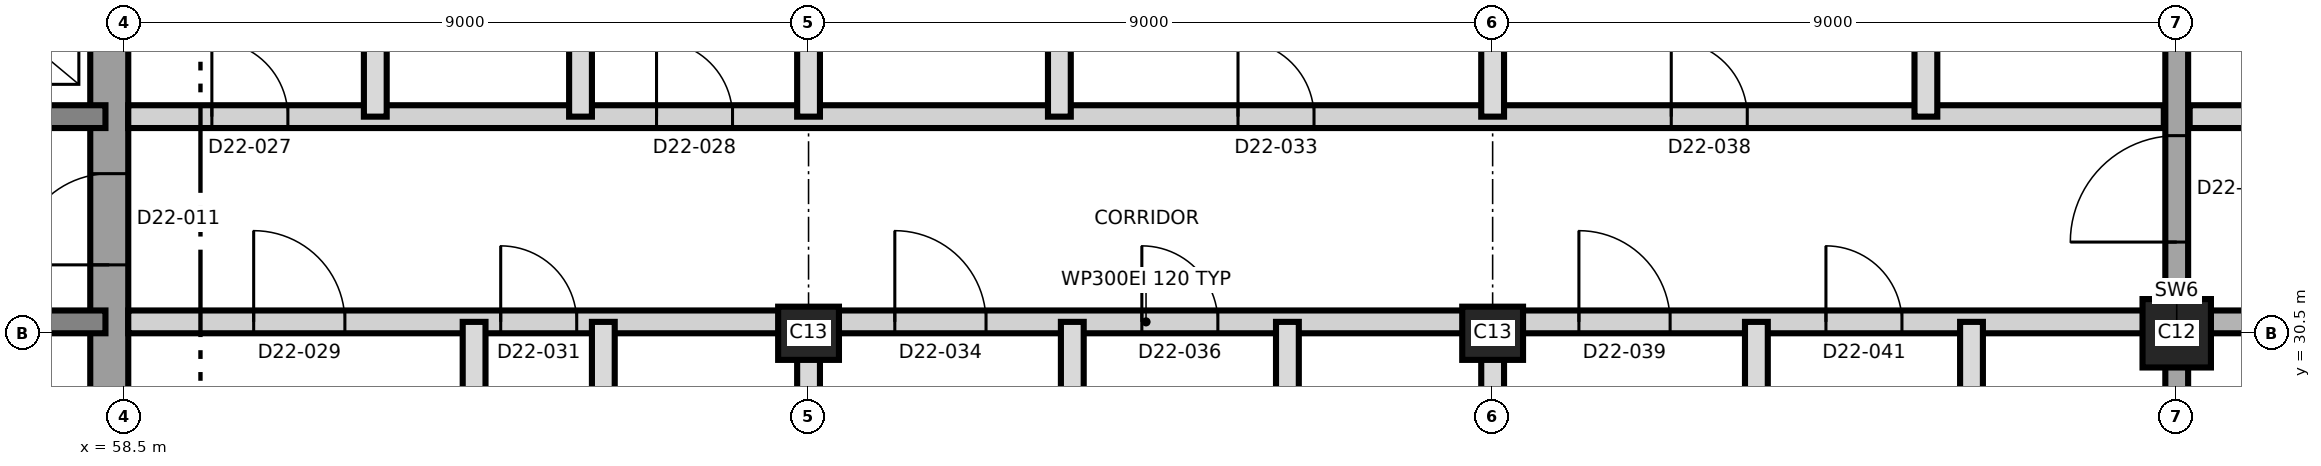
"""IFC4 building model, lengths in metres.
Left out: names, types, materials, properties, quantities, classifications, styles, units other than length and angle.
Written with IfcOpenShell. Run it as: python <this file> out.ifc"""

import sys

from ifc_helpers import new_model, si_unit, direction, frame, frame_2d, origin, origin_2d, place, context, subcontext, project, spatial, rectangle, extrude, element, fill, save


model = new_model("IFC4")
c1 = context("Model", 3, precision=1e-05, world=origin(), true_north=direction((0.0, 1.0)))
c2 = subcontext(c1, "Body", "Model", "MODEL_VIEW")
j1 = project(units=[si_unit("LENGTHUNIT", "METRE"), si_unit("PLANEANGLEUNIT", "RADIAN")], contexts=[c1])
p1 = place(None, origin())
s1 = spatial("IfcSite", under=j1, at=p1, CompositionType="ELEMENT")
p2 = place(p1, origin())
s2 = spatial("IfcBuilding", under=s1, at=p2, CompositionType="ELEMENT")
p3 = place(p2, frame((0.0, 0.0, 199.5)))
s3 = spatial("IfcBuildingStorey", under=s2, at=p3, CompositionType="ELEMENT", Elevation=199.5)
p4 = place(p3, frame((58.3, 21.25, 0.0), z_axis=(0.0, 0.0, 1.0), x_axis=(0.0, 1.0, 0.0)))
e1 = element("IfcWall", 1, at=p4, inside=s3, PredefinedType="SHEAR", context=c2, shape_type="SweptSolid", body=[
    extrude(rectangle(XDim=18.5, YDim=0.5, at=frame_2d((9.25, 0.0))), origin(), (0.0, 0.0, 1.0), 3.7),
])
p5 = place(p4, frame((10.15, 0.0, 0.0)))
e2 = element("IfcOpeningElement", 2, at=p5, cuts=e1, PredefinedType="OPENING", context=c2, shape_type="SweptSolid", body=[
    extrude(rectangle(XDim=1.2, YDim=2.1, at=frame_2d((0.6, 1.05))), frame((0.0, 0.26, 0.0), z_axis=(0.0, -1.0, 0.0), x_axis=(1.0, 0.0, 0.0)), (0.0, 0.0, 1.0), 0.52),
])
p6 = place(p3, frame((31.75, 30.65, 0.0), z_axis=(0.0, 0.0, 1.0), x_axis=(1.0, 0.0, 0.0)))
e3 = element("IfcWall", 3, at=p6, inside=s3, PredefinedType="SHEAR", context=c2, shape_type="SweptSolid", body=[
    extrude(rectangle(XDim=26.5, YDim=0.3, at=frame_2d((13.25, 0.0))), origin(), (0.0, 0.0, 1.0), 3.7),
])
p7 = place(p6, frame((24.75, 0.0, 0.0)))
e4 = element("IfcOpeningElement", 4, at=p7, cuts=e3, PredefinedType="OPENING", context=c2, shape_type="SweptSolid", body=[
    extrude(rectangle(XDim=1.0, YDim=2.1, at=frame_2d((0.5, 1.05))), frame((0.0, 0.16, 0.0), z_axis=(0.0, -1.0, 0.0), x_axis=(1.0, 0.0, 0.0)), (0.0, 0.0, 1.0), 0.32),
])
p8 = place(p6, frame((4.05, 0.0, 0.0)))
e5 = element("IfcOpeningElement", 5, at=p8, cuts=e3, PredefinedType="OPENING", context=c2, shape_type="SweptSolid", body=[
    extrude(rectangle(XDim=1.0, YDim=2.1, at=frame_2d((0.5, 1.05))), frame((0.0, 0.16, 0.0), z_axis=(0.0, -1.0, 0.0), x_axis=(1.0, 0.0, 0.0)), (0.0, 0.0, 1.0), 0.32),
])
p9 = place(p3, frame((31.75, 33.35, 0.0), z_axis=(0.0, 0.0, 1.0), x_axis=(1.0, 0.0, 0.0)))
e6 = element("IfcWall", 6, at=p9, inside=s3, PredefinedType="SHEAR", context=c2, shape_type="SweptSolid", body=[
    extrude(rectangle(XDim=26.5, YDim=0.3, at=frame_2d((13.25, 0.0))), origin(), (0.0, 0.0, 1.0), 3.7),
])
p10 = place(p9, frame((13.9, 0.0, 0.0)))
e7 = element("IfcOpeningElement", 7, at=p10, cuts=e6, PredefinedType="OPENING", context=c2, shape_type="SweptSolid", body=[
    extrude(rectangle(XDim=1.4, YDim=2.1, at=frame_2d((0.7, 1.05))), frame((0.0, 0.16, 0.0), z_axis=(0.0, -1.0, 0.0), x_axis=(1.0, 0.0, 0.0)), (0.0, 0.0, 1.0), 0.32),
])
p11 = place(p9, frame((5.375, 0.0, 0.0)))
e8 = element("IfcOpeningElement", 8, at=p11, cuts=e6, PredefinedType="OPENING", context=c2, shape_type="SweptSolid", body=[
    extrude(rectangle(XDim=1.2, YDim=2.1, at=frame_2d((0.6, 1.05))), frame((0.0, 0.16, 0.0), z_axis=(0.0, -1.0, 0.0), x_axis=(1.0, 0.0, 0.0)), (0.0, 0.0, 1.0), 0.32),
])
p12 = place(p9, frame((19.925, 0.0, 0.0)))
e9 = element("IfcOpeningElement", 9, at=p12, cuts=e6, PredefinedType="OPENING", context=c2, shape_type="SweptSolid", body=[
    extrude(rectangle(XDim=1.2, YDim=2.1, at=frame_2d((0.6, 1.05))), frame((0.0, 0.16, 0.0), z_axis=(0.0, -1.0, 0.0), x_axis=(1.0, 0.0, 0.0)), (0.0, 0.0, 1.0), 0.32),
])
for number, where, z_axis, x_axis in (
    (10, (67.5, 30.5, 0.0), (0.0, 0.0, 1.0), (1.0, 0.0, 0.0)),
    (11, (76.5, 30.5, 0.0), (0.0, 0.0, 1.0), (1.0, 0.0, 0.0)),
):
    element("IfcColumn", number, at=place(p3, frame(where, z_axis=z_axis, x_axis=x_axis)), inside=s3, PredefinedType="COLUMN", context=c2, shape_type="SweptSolid", body=[
        extrude(rectangle(XDim=0.8, YDim=0.7, at=origin_2d()), origin(), (0.0, 0.0, 1.0), 3.7),
    ])
p13 = place(p3, frame((85.5, 30.5, 0.0), z_axis=(0.0, 0.0, 1.0), x_axis=(1.0, 0.0, 0.0)))
e12 = element("IfcColumn", 12, at=p13, inside=s3, PredefinedType="COLUMN", context=c2, shape_type="SweptSolid", body=[
    extrude(rectangle(XDim=0.9, YDim=0.9, at=origin_2d()), origin(), (0.0, 0.0, 1.0), 3.7),
])
p14 = place(p3, frame((85.5, 20.135, 0.0), z_axis=(0.0, 0.0, 1.0), x_axis=(0.0, 1.0, 0.0)))
e13 = element("IfcWall", 13, at=p14, inside=s3, PredefinedType="SHEAR", context=c2, shape_type="SweptSolid", body=[
    extrude(rectangle(XDim=20.73, YDim=0.3, at=frame_2d((10.365, 0.0))), origin(), (0.0, 0.0, 1.0), 3.7),
])
p15 = place(p14, frame((11.565, 0.0, 0.0)))
e14 = element("IfcOpeningElement", 14, at=p15, cuts=e13, PredefinedType="OPENING", context=c2, shape_type="SweptSolid", body=[
    extrude(rectangle(XDim=1.4, YDim=2.1, at=frame_2d((0.7, 1.05))), frame((0.0, 0.16, 0.0), z_axis=(0.0, -1.0, 0.0), x_axis=(1.0, 0.0, 0.0)), (0.0, 0.0, 1.0), 0.32),
])
p16 = place(p3, frame((58.55, 30.65, 0.0), z_axis=(0.0, 0.0, 1.0), x_axis=(1.0, 0.0, 0.0)))
e15 = element("IfcWall", 15, at=p16, inside=s3, PredefinedType="PARTITIONING", context=c2, shape_type="SweptSolid", body=[
    extrude(rectangle(XDim=26.78, YDim=0.3, at=frame_2d((13.39, 0.0))), origin(), (0.0, 0.0, 1.0), 3.4),
])
p17 = place(p16, frame((1.65, 0.0, 0.0)))
e16 = element("IfcOpeningElement", 16, at=p17, cuts=e15, PredefinedType="OPENING", context=c2, shape_type="SweptSolid", body=[
    extrude(rectangle(XDim=1.2, YDim=2.1, at=frame_2d((0.6, 1.05))), frame((0.0, 0.16, 0.0), z_axis=(0.0, -1.0, 0.0), x_axis=(1.0, 0.0, 0.0)), (0.0, 0.0, 1.0), 0.32),
])
p18 = place(p16, frame((4.9, 0.0, 0.0)))
e17 = element("IfcOpeningElement", 17, at=p18, cuts=e15, PredefinedType="OPENING", context=c2, shape_type="SweptSolid", body=[
    extrude(rectangle(XDim=1.0, YDim=2.1, at=frame_2d((0.5, 1.05))), frame((0.0, 0.16, 0.0), z_axis=(0.0, -1.0, 0.0), x_axis=(1.0, 0.0, 0.0)), (0.0, 0.0, 1.0), 0.32),
])
p19 = place(p16, frame((10.085, 0.0, 0.0)))
e18 = element("IfcOpeningElement", 18, at=p19, cuts=e15, PredefinedType="OPENING", context=c2, shape_type="SweptSolid", body=[
    extrude(rectangle(XDim=1.2, YDim=2.1, at=frame_2d((0.6, 1.05))), frame((0.0, 0.16, 0.0), z_axis=(0.0, -1.0, 0.0), x_axis=(1.0, 0.0, 0.0)), (0.0, 0.0, 1.0), 0.32),
])
p20 = place(p16, frame((13.335, 0.0, 0.0)))
e19 = element("IfcOpeningElement", 19, at=p20, cuts=e15, PredefinedType="OPENING", context=c2, shape_type="SweptSolid", body=[
    extrude(rectangle(XDim=1.0, YDim=2.1, at=frame_2d((0.5, 1.05))), frame((0.0, 0.16, 0.0), z_axis=(0.0, -1.0, 0.0), x_axis=(1.0, 0.0, 0.0)), (0.0, 0.0, 1.0), 0.32),
])
p21 = place(p16, frame((19.085, 0.0, 0.0)))
e20 = element("IfcOpeningElement", 20, at=p21, cuts=e15, PredefinedType="OPENING", context=c2, shape_type="SweptSolid", body=[
    extrude(rectangle(XDim=1.2, YDim=2.1, at=frame_2d((0.6, 1.05))), frame((0.0, 0.16, 0.0), z_axis=(0.0, -1.0, 0.0), x_axis=(1.0, 0.0, 0.0)), (0.0, 0.0, 1.0), 0.32),
])
p22 = place(p16, frame((22.335, 0.0, 0.0)))
e21 = element("IfcOpeningElement", 21, at=p22, cuts=e15, PredefinedType="OPENING", context=c2, shape_type="SweptSolid", body=[
    extrude(rectangle(XDim=1.0, YDim=2.1, at=frame_2d((0.5, 1.05))), frame((0.0, 0.16, 0.0), z_axis=(0.0, -1.0, 0.0), x_axis=(1.0, 0.0, 0.0)), (0.0, 0.0, 1.0), 0.32),
])
p23 = place(p3, frame((85.67, 30.65, 0.0), z_axis=(0.0, 0.0, 1.0), x_axis=(1.0, 0.0, 0.0)))
e22 = element("IfcWall", 22, at=p23, inside=s3, PredefinedType="SHEAR", context=c2, shape_type="SweptSolid", body=[
    extrude(rectangle(XDim=9.58, YDim=0.3, at=frame_2d((4.79, 0.0))), origin(), (0.0, 0.0, 1.0), 3.4),
])
p24 = place(p23, frame((2.08, 0.0, 0.0)))
e23 = element("IfcOpeningElement", 23, at=p24, cuts=e22, PredefinedType="OPENING", context=c2, shape_type="SweptSolid", body=[
    extrude(rectangle(XDim=1.2, YDim=2.1, at=frame_2d((0.6, 1.05))), frame((0.0, 0.16, 0.0), z_axis=(0.0, -1.0, 0.0), x_axis=(1.0, 0.0, 0.0)), (0.0, 0.0, 1.0), 0.32),
])
p25 = place(p23, frame((5.63, 0.0, 0.0)))
e24 = element("IfcOpeningElement", 24, at=p25, cuts=e22, PredefinedType="OPENING", context=c2, shape_type="SweptSolid", body=[
    extrude(rectangle(XDim=1.0, YDim=2.1, at=frame_2d((0.5, 1.05))), frame((0.0, 0.16, 0.0), z_axis=(0.0, -1.0, 0.0), x_axis=(1.0, 0.0, 0.0)), (0.0, 0.0, 1.0), 0.32),
])
p26 = place(p3, frame((58.55, 33.35, 0.0), z_axis=(0.0, 0.0, 1.0), x_axis=(1.0, 0.0, 0.0)))
e25 = element("IfcWall", 25, at=p26, inside=s3, PredefinedType="PARTITIONING", context=c2, shape_type="SweptSolid", body=[
    extrude(rectangle(XDim=26.78, YDim=0.3, at=frame_2d((13.39, 0.0))), origin(), (0.0, 0.0, 1.0), 3.4),
])
p27 = place(p26, frame((1.1, 0.0, 0.0)))
e26 = element("IfcOpeningElement", 26, at=p27, cuts=e25, PredefinedType="OPENING", context=c2, shape_type="SweptSolid", body=[
    extrude(rectangle(XDim=1.0, YDim=2.1, at=frame_2d((0.5, 1.05))), frame((0.0, 0.16, 0.0), z_axis=(0.0, -1.0, 0.0), x_axis=(1.0, 0.0, 0.0)), (0.0, 0.0, 1.0), 0.32),
])
p28 = place(p26, frame((6.95, 0.0, 0.0)))
e27 = element("IfcOpeningElement", 27, at=p28, cuts=e25, PredefinedType="OPENING", context=c2, shape_type="SweptSolid", body=[
    extrude(rectangle(XDim=1.0, YDim=2.1, at=frame_2d((0.5, 1.05))), frame((0.0, 0.16, 0.0), z_axis=(0.0, -1.0, 0.0), x_axis=(1.0, 0.0, 0.0)), (0.0, 0.0, 1.0), 0.32),
])
p29 = place(p26, frame((14.6, 0.0, 0.0)))
e28 = element("IfcOpeningElement", 28, at=p29, cuts=e25, PredefinedType="OPENING", context=c2, shape_type="SweptSolid", body=[
    extrude(rectangle(XDim=1.0, YDim=2.4, at=frame_2d((0.5, 1.2))), frame((0.0, 0.16, 0.0), z_axis=(0.0, -1.0, 0.0), x_axis=(1.0, 0.0, 0.0)), (0.0, 0.0, 1.0), 0.32),
])
p30 = place(p26, frame((20.3, 0.0, 0.0)))
e29 = element("IfcOpeningElement", 29, at=p30, cuts=e25, PredefinedType="OPENING", context=c2, shape_type="SweptSolid", body=[
    extrude(rectangle(XDim=1.0, YDim=2.4, at=frame_2d((0.5, 1.2))), frame((0.0, 0.16, 0.0), z_axis=(0.0, -1.0, 0.0), x_axis=(1.0, 0.0, 0.0)), (0.0, 0.0, 1.0), 0.32),
])
p31 = place(p3, frame((85.67, 33.35, 0.0), z_axis=(0.0, 0.0, 1.0), x_axis=(1.0, 0.0, 0.0)))
e30 = element("IfcWall", 30, at=p31, inside=s3, PredefinedType="PARTITIONING", context=c2, shape_type="SweptSolid", body=[
    extrude(rectangle(XDim=9.58, YDim=0.3, at=frame_2d((4.79, 0.0))), origin(), (0.0, 0.0, 1.0), 3.4),
])
p32 = place(p31, frame((1.83, 0.0, 0.0)))
e31 = element("IfcOpeningElement", 31, at=p32, cuts=e30, PredefinedType="OPENING", context=c2, shape_type="SweptSolid", body=[
    extrude(rectangle(XDim=1.0, YDim=2.1, at=frame_2d((0.5, 1.05))), frame((0.0, 0.16, 0.0), z_axis=(0.0, -1.0, 0.0), x_axis=(1.0, 0.0, 0.0)), (0.0, 0.0, 1.0), 0.32),
])
p33 = place(p31, frame((5.63, 0.0, 0.0)))
e32 = element("IfcOpeningElement", 32, at=p33, cuts=e30, PredefinedType="OPENING", context=c2, shape_type="SweptSolid", body=[
    extrude(rectangle(XDim=1.0, YDim=2.1, at=frame_2d((0.5, 1.05))), frame((0.0, 0.16, 0.0), z_axis=(0.0, -1.0, 0.0), x_axis=(1.0, 0.0, 0.0)), (0.0, 0.0, 1.0), 0.32),
])
p34 = place(p3, frame((61.8, 33.35, 0.0), z_axis=(0.0, 0.0, 1.0), x_axis=(0.0, 1.0, 0.0)))
e33 = element("IfcWall", 33, at=p34, inside=s3, PredefinedType="PARTITIONING", context=c2, shape_type="SweptSolid", body=[
    extrude(rectangle(XDim=3.2, YDim=0.3, at=frame_2d((1.6, 0.0))), origin(), (0.0, 0.0, 1.0), 3.4),
])
p35 = place(p3, frame((63.1, 20.135, 0.0), z_axis=(0.0, 0.0, 1.0), x_axis=(0.0, 1.0, 0.0)))
e34 = element("IfcWall", 34, at=p35, inside=s3, PredefinedType="PARTITIONING", context=c2, shape_type="SweptSolid", body=[
    extrude(rectangle(XDim=10.515, YDim=0.3, at=frame_2d((5.257, 0.0))), origin(), (0.0, 0.0, 1.0), 3.4),
])
p36 = place(p3, frame((64.5, 33.35, 0.0), z_axis=(0.0, 0.0, 1.0), x_axis=(0.0, 1.0, 0.0)))
e35 = element("IfcWall", 35, at=p36, inside=s3, PredefinedType="PARTITIONING", context=c2, shape_type="SweptSolid", body=[
    extrude(rectangle(XDim=7.695, YDim=0.3, at=frame_2d((3.847, 0.0))), origin(), (0.0, 0.0, 1.0), 3.4),
])
p37 = place(p3, frame((64.8, 27.45, 0.0), z_axis=(0.0, 0.0, 1.0), x_axis=(0.0, 1.0, 0.0)))
e36 = element("IfcWall", 36, at=p37, inside=s3, PredefinedType="PARTITIONING", context=c2, shape_type="SweptSolid", body=[
    extrude(rectangle(XDim=3.2, YDim=0.3, at=frame_2d((1.6, 0.0))), origin(), (0.0, 0.0, 1.0), 3.4),
])
p38 = place(p3, frame((67.5, 20.135, 0.0), z_axis=(0.0, 0.0, 1.0), x_axis=(0.0, 1.0, 0.0)))
e37 = element("IfcWall", 37, at=p38, inside=s3, PredefinedType="PARTITIONING", context=c2, shape_type="SweptSolid", body=[
    extrude(rectangle(XDim=10.515, YDim=0.3, at=frame_2d((5.257, 0.0))), origin(), (0.0, 0.0, 1.0), 3.4),
])
p39 = place(p3, frame((67.5, 33.35, 0.0), z_axis=(0.0, 0.0, 1.0), x_axis=(0.0, 1.0, 0.0)))
e38 = element("IfcWall", 38, at=p39, inside=s3, PredefinedType="PARTITIONING", context=c2, shape_type="SweptSolid", body=[
    extrude(rectangle(XDim=7.695, YDim=0.3, at=frame_2d((3.847, 0.0))), origin(), (0.0, 0.0, 1.0), 3.4),
])
p40 = place(p3, frame((70.8, 33.35, 0.0), z_axis=(0.0, 0.0, 1.0), x_axis=(0.0, 1.0, 0.0)))
e39 = element("IfcWall", 39, at=p40, inside=s3, PredefinedType="PARTITIONING", context=c2, shape_type="SweptSolid", body=[
    extrude(rectangle(XDim=3.5, YDim=0.3, at=frame_2d((1.75, 0.0))), origin(), (0.0, 0.0, 1.0), 3.4),
])
p41 = place(p3, frame((70.97, 20.135, 0.0), z_axis=(0.0, 0.0, 1.0), x_axis=(0.0, 1.0, 0.0)))
e40 = element("IfcWall", 40, at=p41, inside=s3, PredefinedType="PARTITIONING", context=c2, shape_type="SweptSolid", body=[
    extrude(rectangle(XDim=10.515, YDim=0.3, at=frame_2d((5.257, 0.0))), origin(), (0.0, 0.0, 1.0), 3.4),
])
p42 = place(p3, frame((73.8, 27.45, 0.0), z_axis=(0.0, 0.0, 1.0), x_axis=(0.0, 1.0, 0.0)))
e41 = element("IfcWall", 41, at=p42, inside=s3, PredefinedType="PARTITIONING", context=c2, shape_type="SweptSolid", body=[
    extrude(rectangle(XDim=3.2, YDim=0.3, at=frame_2d((1.6, 0.0))), origin(), (0.0, 0.0, 1.0), 3.4),
])
p43 = place(p3, frame((76.5, 20.135, 0.0), z_axis=(0.0, 0.0, 1.0), x_axis=(0.0, 1.0, 0.0)))
e42 = element("IfcWall", 42, at=p43, inside=s3, PredefinedType="PARTITIONING", context=c2, shape_type="SweptSolid", body=[
    extrude(rectangle(XDim=10.515, YDim=0.3, at=frame_2d((5.257, 0.0))), origin(), (0.0, 0.0, 1.0), 3.4),
])
p44 = place(p3, frame((76.5, 33.35, 0.0), z_axis=(0.0, 0.0, 1.0), x_axis=(0.0, 1.0, 0.0)))
e43 = element("IfcWall", 43, at=p44, inside=s3, PredefinedType="PARTITIONING", context=c2, shape_type="SweptSolid", body=[
    extrude(rectangle(XDim=7.695, YDim=0.3, at=frame_2d((3.847, 0.0))), origin(), (0.0, 0.0, 1.0), 3.4),
])
p45 = place(p3, frame((79.97, 20.135, 0.0), z_axis=(0.0, 0.0, 1.0), x_axis=(0.0, 1.0, 0.0)))
e44 = element("IfcWall", 44, at=p45, inside=s3, PredefinedType="PARTITIONING", context=c2, shape_type="SweptSolid", body=[
    extrude(rectangle(XDim=10.515, YDim=0.3, at=frame_2d((5.257, 0.0))), origin(), (0.0, 0.0, 1.0), 3.4),
])
p46 = place(p3, frame((82.2, 33.35, 0.0), z_axis=(0.0, 0.0, 1.0), x_axis=(0.0, 1.0, 0.0)))
e45 = element("IfcWall", 45, at=p46, inside=s3, PredefinedType="PARTITIONING", context=c2, shape_type="SweptSolid", body=[
    extrude(rectangle(XDim=3.5, YDim=0.3, at=frame_2d((1.75, 0.0))), origin(), (0.0, 0.0, 1.0), 3.4),
])
p47 = place(p3, frame((82.8, 27.45, 0.0), z_axis=(0.0, 0.0, 1.0), x_axis=(0.0, 1.0, 0.0)))
e46 = element("IfcWall", 46, at=p47, inside=s3, PredefinedType="PARTITIONING", context=c2, shape_type="SweptSolid", body=[
    extrude(rectangle(XDim=3.2, YDim=0.3, at=frame_2d((1.6, 0.0))), origin(), (0.0, 0.0, 1.0), 3.4),
])
p48 = place(p5, origin())
e47 = element("IfcDoor", 47, at=p48, inside=s3, OperationType="SINGLE_SWING_LEFT", PredefinedType="DOOR", context=c2, shape_type="SweptSolid", body=[
    extrude(rectangle(XDim=1.2, YDim=2.1, at=frame_2d((0.6, 1.05))), frame((0.0, 0.025, 0.0), z_axis=(0.0, -1.0, 0.0), x_axis=(1.0, 0.0, 0.0)), (0.0, 0.0, 1.0), 0.05),
])
fill(e2, e47)
p49 = place(p27, origin())
e48 = element("IfcDoor", 48, at=p49, inside=s3, OperationType="SINGLE_SWING_LEFT", PredefinedType="DOOR", context=c2, shape_type="SweptSolid", body=[
    extrude(rectangle(XDim=1.0, YDim=2.1, at=frame_2d((0.5, 1.05))), frame((0.0, 0.025, 0.0), z_axis=(0.0, -1.0, 0.0), x_axis=(1.0, 0.0, 0.0)), (0.0, 0.0, 1.0), 0.05),
])
fill(e26, e48)
p50 = place(p28, origin())
e49 = element("IfcDoor", 49, at=p50, inside=s3, OperationType="SINGLE_SWING_RIGHT", PredefinedType="DOOR", context=c2, shape_type="SweptSolid", body=[
    extrude(rectangle(XDim=1.0, YDim=2.1, at=frame_2d((0.5, 1.05))), frame((0.0, 0.025, 0.0), z_axis=(0.0, -1.0, 0.0), x_axis=(1.0, 0.0, 0.0)), (0.0, 0.0, 1.0), 0.05),
])
fill(e27, e49)
p51 = place(p17, origin())
e50 = element("IfcDoor", 50, at=p51, inside=s3, OperationType="SINGLE_SWING_LEFT", PredefinedType="DOOR", context=c2, shape_type="SweptSolid", body=[
    extrude(rectangle(XDim=1.2, YDim=2.1, at=frame_2d((0.6, 1.05))), frame((0.0, 0.025, 0.0), z_axis=(0.0, -1.0, 0.0), x_axis=(1.0, 0.0, 0.0)), (0.0, 0.0, 1.0), 0.05),
])
fill(e16, e50)
p52 = place(p18, origin())
e51 = element("IfcDoor", 51, at=p52, inside=s3, OperationType="SINGLE_SWING_LEFT", PredefinedType="DOOR", context=c2, shape_type="SweptSolid", body=[
    extrude(rectangle(XDim=1.0, YDim=2.1, at=frame_2d((0.5, 1.05))), frame((0.0, 0.025, 0.0), z_axis=(0.0, -1.0, 0.0), x_axis=(1.0, 0.0, 0.0)), (0.0, 0.0, 1.0), 0.05),
])
fill(e17, e51)
p53 = place(p29, origin())
e52 = element("IfcDoor", 52, at=p53, inside=s3, OperationType="SINGLE_SWING_LEFT", PredefinedType="DOOR", context=c2, shape_type="SweptSolid", body=[
    extrude(rectangle(XDim=1.0, YDim=2.4, at=frame_2d((0.5, 1.2))), frame((0.0, 0.025, 0.0), z_axis=(0.0, -1.0, 0.0), x_axis=(1.0, 0.0, 0.0)), (0.0, 0.0, 1.0), 0.05),
])
fill(e28, e52)
p54 = place(p19, origin())
e53 = element("IfcDoor", 53, at=p54, inside=s3, OperationType="SINGLE_SWING_RIGHT", PredefinedType="DOOR", context=c2, shape_type="SweptSolid", body=[
    extrude(rectangle(XDim=1.2, YDim=2.1, at=frame_2d((0.6, 1.05))), frame((0.0, 0.025, 0.0), z_axis=(0.0, -1.0, 0.0), x_axis=(1.0, 0.0, 0.0)), (0.0, 0.0, 1.0), 0.05),
])
fill(e18, e53)
p55 = place(p20, origin())
e54 = element("IfcDoor", 54, at=p55, inside=s3, OperationType="SINGLE_SWING_LEFT", PredefinedType="DOOR", context=c2, shape_type="SweptSolid", body=[
    extrude(rectangle(XDim=1.0, YDim=2.1, at=frame_2d((0.5, 1.05))), frame((0.0, 0.025, 0.0), z_axis=(0.0, -1.0, 0.0), x_axis=(1.0, 0.0, 0.0)), (0.0, 0.0, 1.0), 0.05),
])
fill(e19, e54)
p56 = place(p30, origin())
e55 = element("IfcDoor", 55, at=p56, inside=s3, OperationType="SINGLE_SWING_RIGHT", PredefinedType="DOOR", context=c2, shape_type="SweptSolid", body=[
    extrude(rectangle(XDim=1.0, YDim=2.4, at=frame_2d((0.5, 1.2))), frame((0.0, 0.025, 0.0), z_axis=(0.0, -1.0, 0.0), x_axis=(1.0, 0.0, 0.0)), (0.0, 0.0, 1.0), 0.05),
])
fill(e29, e55)
p57 = place(p21, origin())
e56 = element("IfcDoor", 56, at=p57, inside=s3, OperationType="SINGLE_SWING_LEFT", PredefinedType="DOOR", context=c2, shape_type="SweptSolid", body=[
    extrude(rectangle(XDim=1.2, YDim=2.1, at=frame_2d((0.6, 1.05))), frame((0.0, 0.025, 0.0), z_axis=(0.0, -1.0, 0.0), x_axis=(1.0, 0.0, 0.0)), (0.0, 0.0, 1.0), 0.05),
])
fill(e20, e56)
p58 = place(p22, origin())
e57 = element("IfcDoor", 57, at=p58, inside=s3, OperationType="SINGLE_SWING_RIGHT", PredefinedType="DOOR", context=c2, shape_type="SweptSolid", body=[
    extrude(rectangle(XDim=1.0, YDim=2.1, at=frame_2d((0.5, 1.05))), frame((0.0, 0.025, 0.0), z_axis=(0.0, -1.0, 0.0), x_axis=(1.0, 0.0, 0.0)), (0.0, 0.0, 1.0), 0.05),
])
fill(e21, e57)
p59 = place(p15, origin())
e58 = element("IfcDoor", 58, at=p59, inside=s3, OperationType="SINGLE_SWING_RIGHT", PredefinedType="DOOR", context=c2, shape_type="SweptSolid", body=[
    extrude(rectangle(XDim=1.4, YDim=2.1, at=frame_2d((0.7, 1.05))), frame((0.0, 0.025, 0.0), z_axis=(0.0, -1.0, 0.0), x_axis=(1.0, 0.0, 0.0)), (0.0, 0.0, 1.0), 0.05),
])
fill(e14, e58)
save(model, sys.argv[1])
